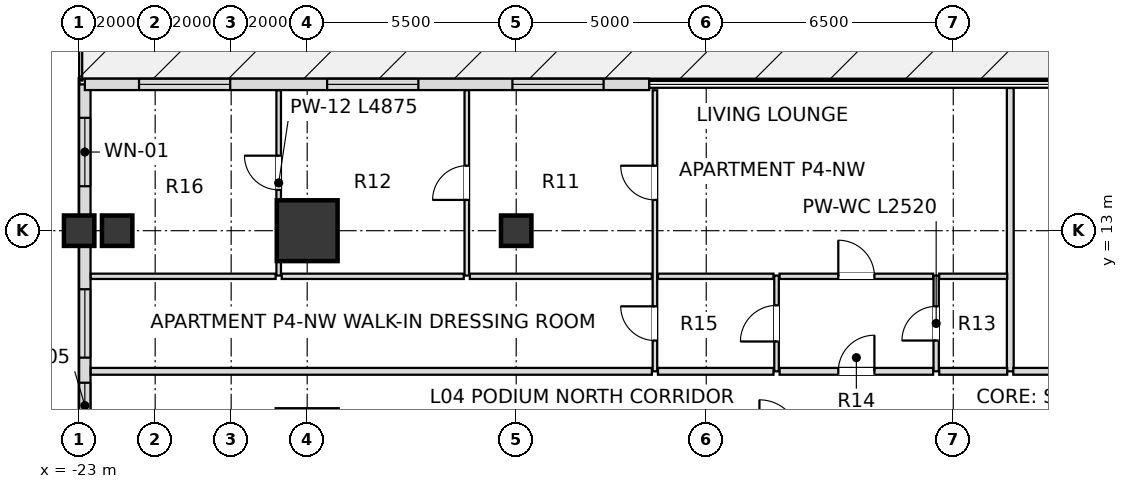
"""IFC4 building model, lengths in metres.
Left out: names, types, materials, properties, quantities, classifications, styles, units other than length and angle.
Written with IfcOpenShell. Run it as: python <this file> out.ifc"""

import sys

from ifc_helpers import new_model, si_unit, direction, frame, frame_2d, origin, origin_2d, place, context, subcontext, project, spatial, rectangle, extrude, element, fill, save


model = new_model("IFC4")
c1 = context("Model", 3, precision=1e-05, world=origin(), true_north=direction((0.0, 1.0)))
c2 = subcontext(c1, "Body", "Model", "MODEL_VIEW")
j1 = project(units=[si_unit("LENGTHUNIT", "METRE"), si_unit("PLANEANGLEUNIT", "RADIAN")], contexts=[c1])
p1 = place(None, origin())
s1 = spatial("IfcSite", under=j1, at=p1, CompositionType="ELEMENT")
p2 = place(p1, origin())
s2 = spatial("IfcBuilding", under=s1, at=p2, CompositionType="ELEMENT")
p3 = place(p2, frame((0.0, 0.0, 22.2)))
s3 = spatial("IfcBuildingStorey", under=s2, at=p3, CompositionType="ELEMENT", Elevation=22.2)
p4 = place(p3, frame((-17.0, 13.0, 0.0), z_axis=(0.0, 0.0, 1.0), x_axis=(1.0, 0.0, 0.0)))
e1 = element("IfcColumn", 1, at=p4, inside=s3, PredefinedType="USERDEFINED", context=c2, shape_type="SweptSolid", body=[
    extrude(rectangle(XDim=1.6, YDim=1.6, at=origin_2d()), origin(), (0.0, 0.0, 1.0), 5.4),
])
for number, where, z_axis, x_axis in (
    (2, (-23.0, 13.0, 0.0), (0.0, 0.0, 1.0), (1.0, 0.0, 0.0)),
    (3, (-11.5, 13.0, 0.0), (0.0, 0.0, 1.0), (1.0, 0.0, 0.0)),
    (4, (-22.0, 13.0, 0.0), (0.0, 0.0, 1.0), (1.0, 0.0, 0.0)),
):
    element("IfcColumn", number, at=place(p3, frame(where, z_axis=z_axis, x_axis=x_axis)), inside=s3, PredefinedType="COLUMN", context=c2, shape_type="SweptSolid", body=[
        extrude(rectangle(XDim=0.8, YDim=0.8, at=origin_2d()), origin(), (0.0, 0.0, 1.0), 5.4),
    ])
p5 = place(p3, frame((-22.85, 16.85, 0.0), z_axis=(0.0, 0.0, 1.0), x_axis=(0.0, -1.0, 0.0)))
e5 = element("IfcWall", 5, at=p5, inside=s3, PredefinedType="SOLIDWALL", context=c2, shape_type="SweptSolid", body=[
    extrude(rectangle(XDim=33.7, YDim=0.3, at=frame_2d((16.85, 0.0))), origin(), (0.0, 0.0, 1.0), 2.985),
])
p6 = place(p5, frame((0.88, 0.0, 0.72)))
e6 = element("IfcOpeningElement", 6, at=p6, cuts=e5, PredefinedType="OPENING", context=c2, shape_type="SweptSolid", body=[
    extrude(rectangle(XDim=1.8, YDim=1.68, at=frame_2d((0.9, 0.84))), frame((0.0, 0.16, 0.0), z_axis=(0.0, -1.0, 0.0), x_axis=(1.0, 0.0, 0.0)), (0.0, 0.0, 1.0), 0.32),
])
p7 = place(p5, frame((5.39, 0.0, 0.72)))
e7 = element("IfcOpeningElement", 7, at=p7, cuts=e5, PredefinedType="OPENING", context=c2, shape_type="SweptSolid", body=[
    extrude(rectangle(XDim=1.8, YDim=1.68, at=frame_2d((0.9, 0.84))), frame((0.0, 0.16, 0.0), z_axis=(0.0, -1.0, 0.0), x_axis=(1.0, 0.0, 0.0)), (0.0, 0.0, 1.0), 0.32),
])
p8 = place(p5, frame((7.85, 0.0, 0.72)))
e8 = element("IfcOpeningElement", 8, at=p8, cuts=e5, PredefinedType="OPENING", context=c2, shape_type="SweptSolid", body=[
    extrude(rectangle(XDim=1.2, YDim=1.68, at=frame_2d((0.6, 0.84))), frame((0.0, 0.16, 0.0), z_axis=(0.0, -1.0, 0.0), x_axis=(1.0, 0.0, 0.0)), (0.0, 0.0, 1.0), 0.32),
])
p9 = place(p5, frame((10.295, 0.0, 0.72)))
e9 = element("IfcOpeningElement", 9, at=p9, cuts=e5, PredefinedType="OPENING", context=c2, shape_type="SweptSolid", body=[
    extrude(rectangle(XDim=1.8, YDim=1.68, at=frame_2d((0.9, 0.84))), frame((0.0, 0.16, 0.0), z_axis=(0.0, -1.0, 0.0), x_axis=(1.0, 0.0, 0.0)), (0.0, 0.0, 1.0), 0.32),
])
p10 = place(p5, frame((13.665, 0.0, 0.72)))
e10 = element("IfcOpeningElement", 10, at=p10, cuts=e5, PredefinedType="OPENING", context=c2, shape_type="SweptSolid", body=[
    extrude(rectangle(XDim=1.8, YDim=1.68, at=frame_2d((0.9, 0.84))), frame((0.0, 0.16, 0.0), z_axis=(0.0, -1.0, 0.0), x_axis=(1.0, 0.0, 0.0)), (0.0, 0.0, 1.0), 0.32),
])
p11 = place(p5, frame((18.235, 0.0, 0.72)))
e11 = element("IfcOpeningElement", 11, at=p11, cuts=e5, PredefinedType="OPENING", context=c2, shape_type="SweptSolid", body=[
    extrude(rectangle(XDim=1.8, YDim=1.68, at=frame_2d((0.9, 0.84))), frame((0.0, 0.16, 0.0), z_axis=(0.0, -1.0, 0.0), x_axis=(1.0, 0.0, 0.0)), (0.0, 0.0, 1.0), 0.32),
])
p12 = place(p5, frame((21.605, 0.0, 0.72)))
e12 = element("IfcOpeningElement", 12, at=p12, cuts=e5, PredefinedType="OPENING", context=c2, shape_type="SweptSolid", body=[
    extrude(rectangle(XDim=1.8, YDim=1.68, at=frame_2d((0.9, 0.84))), frame((0.0, 0.16, 0.0), z_axis=(0.0, -1.0, 0.0), x_axis=(1.0, 0.0, 0.0)), (0.0, 0.0, 1.0), 0.32),
])
p13 = place(p5, frame((24.65, 0.0, 0.72)))
e13 = element("IfcOpeningElement", 13, at=p13, cuts=e5, PredefinedType="OPENING", context=c2, shape_type="SweptSolid", body=[
    extrude(rectangle(XDim=1.2, YDim=1.68, at=frame_2d((0.6, 0.84))), frame((0.0, 0.16, 0.0), z_axis=(0.0, -1.0, 0.0), x_axis=(1.0, 0.0, 0.0)), (0.0, 0.0, 1.0), 0.32),
])
p14 = place(p5, frame((26.51, 0.0, 0.72)))
e14 = element("IfcOpeningElement", 14, at=p14, cuts=e5, PredefinedType="OPENING", context=c2, shape_type="SweptSolid", body=[
    extrude(rectangle(XDim=1.8, YDim=1.68, at=frame_2d((0.9, 0.84))), frame((0.0, 0.16, 0.0), z_axis=(0.0, -1.0, 0.0), x_axis=(1.0, 0.0, 0.0)), (0.0, 0.0, 1.0), 0.32),
])
p15 = place(p5, frame((31.02, 0.0, 0.72)))
e15 = element("IfcOpeningElement", 15, at=p15, cuts=e5, PredefinedType="OPENING", context=c2, shape_type="SweptSolid", body=[
    extrude(rectangle(XDim=1.8, YDim=1.68, at=frame_2d((0.9, 0.84))), frame((0.0, 0.16, 0.0), z_axis=(0.0, -1.0, 0.0), x_axis=(1.0, 0.0, 0.0)), (0.0, 0.0, 1.0), 0.32),
])
p16 = place(p3, frame((-22.85, 16.85, 0.0), z_axis=(0.0, 0.0, 1.0), x_axis=(1.0, 0.0, 0.0)))
e16 = element("IfcWall", 16, at=p16, inside=s3, PredefinedType="SOLIDWALL", context=c2, shape_type="SweptSolid", body=[
    extrude(rectangle(XDim=14.85, YDim=0.3, at=frame_2d((7.425, 0.0))), origin(), (0.0, 0.0, 1.0), 4.356),
])
p17 = place(p16, frame((1.425, 0.0, 0.8)))
e17 = element("IfcOpeningElement", 17, at=p17, cuts=e16, PredefinedType="OPENING", context=c2, shape_type="SweptSolid", body=[
    extrude(rectangle(XDim=2.4, YDim=2.2, at=frame_2d((1.2, 1.1))), frame((0.0, 0.16, 0.0), z_axis=(0.0, -1.0, 0.0), x_axis=(1.0, 0.0, 0.0)), (0.0, 0.0, 1.0), 0.32),
])
p18 = place(p16, frame((6.375, 0.0, 0.8)))
e18 = element("IfcOpeningElement", 18, at=p18, cuts=e16, PredefinedType="OPENING", context=c2, shape_type="SweptSolid", body=[
    extrude(rectangle(XDim=2.4, YDim=2.2, at=frame_2d((1.2, 1.1))), frame((0.0, 0.16, 0.0), z_axis=(0.0, -1.0, 0.0), x_axis=(1.0, 0.0, 0.0)), (0.0, 0.0, 1.0), 0.32),
])
p19 = place(p16, frame((11.25, 0.0, 0.8)))
e19 = element("IfcOpeningElement", 19, at=p19, cuts=e16, PredefinedType="OPENING", context=c2, shape_type="SweptSolid", body=[
    extrude(rectangle(XDim=2.4, YDim=2.2, at=frame_2d((1.2, 1.1))), frame((0.0, 0.16, 0.0), z_axis=(0.0, -1.0, 0.0), x_axis=(1.0, 0.0, 0.0)), (0.0, 0.0, 1.0), 0.32),
])
p20 = place(p3, frame((-17.75, 11.82, 0.0), z_axis=(0.0, 0.0, 1.0), x_axis=(0.0, 1.0, 0.0)))
e20 = element("IfcWall", 20, at=p20, inside=s3, PredefinedType="PARTITIONING", context=c2, shape_type="SweptSolid", body=[
    extrude(rectangle(XDim=4.875, YDim=0.12, at=frame_2d((2.438, 0.0))), origin(), (0.0, 0.0, 1.0), 2.985),
])
p21 = place(p20, frame((2.254, 0.0, 0.0)))
e21 = element("IfcOpeningElement", 21, at=p21, cuts=e20, PredefinedType="OPENING", context=c2, shape_type="SweptSolid", body=[
    extrude(rectangle(XDim=0.9, YDim=2.1, at=frame_2d((0.45, 1.05))), frame((0.0, 0.07, 0.0), z_axis=(0.0, -1.0, 0.0), x_axis=(1.0, 0.0, 0.0)), (0.0, 0.0, 1.0), 0.14),
])
p22 = place(p3, frame((-12.8, 11.82, 0.0), z_axis=(0.0, 0.0, 1.0), x_axis=(0.0, 1.0, 0.0)))
e22 = element("IfcWall", 22, at=p22, inside=s3, PredefinedType="PARTITIONING", context=c2, shape_type="SweptSolid", body=[
    extrude(rectangle(XDim=4.875, YDim=0.12, at=frame_2d((2.438, 0.0))), origin(), (0.0, 0.0, 1.0), 4.356),
])
p23 = place(p22, frame((1.99, 0.0, 0.0)))
e23 = element("IfcOpeningElement", 23, at=p23, cuts=e22, PredefinedType="OPENING", context=c2, shape_type="SweptSolid", body=[
    extrude(rectangle(XDim=0.9, YDim=2.1, at=frame_2d((0.45, 1.05))), frame((0.0, 0.07, 0.0), z_axis=(0.0, -1.0, 0.0), x_axis=(1.0, 0.0, 0.0)), (0.0, 0.0, 1.0), 0.14),
])
p24 = place(p3, frame((-7.85, 9.3, 0.0), z_axis=(0.0, 0.0, 1.0), x_axis=(0.0, 1.0, 0.0)))
e24 = element("IfcWall", 24, at=p24, inside=s3, PredefinedType="PARTITIONING", context=c2, shape_type="SweptSolid", body=[
    extrude(rectangle(XDim=7.395, YDim=0.12, at=frame_2d((3.698, 0.0))), origin(), (0.0, 0.0, 1.0), 4.436),
])
p25 = place(p24, frame((0.81, 0.0, 0.0)))
e25 = element("IfcOpeningElement", 25, at=p25, cuts=e24, PredefinedType="OPENING", context=c2, shape_type="SweptSolid", body=[
    extrude(rectangle(XDim=0.9, YDim=2.1, at=frame_2d((0.45, 1.05))), frame((0.0, 0.07, 0.0), z_axis=(0.0, -1.0, 0.0), x_axis=(1.0, 0.0, 0.0)), (0.0, 0.0, 1.0), 0.14),
])
p26 = place(p24, frame((4.51, 0.0, 0.0)))
e26 = element("IfcOpeningElement", 26, at=p26, cuts=e24, PredefinedType="OPENING", context=c2, shape_type="SweptSolid", body=[
    extrude(rectangle(XDim=0.9, YDim=2.1, at=frame_2d((0.45, 1.05))), frame((0.0, 0.07, 0.0), z_axis=(0.0, -1.0, 0.0), x_axis=(1.0, 0.0, 0.0)), (0.0, 0.0, 1.0), 0.14),
])
p27 = place(p3, frame((-4.65, 9.3, 0.0), z_axis=(0.0, 0.0, 1.0), x_axis=(0.0, 1.0, 0.0)))
e27 = element("IfcWall", 27, at=p27, inside=s3, PredefinedType="PARTITIONING", context=c2, shape_type="SweptSolid", body=[
    extrude(rectangle(XDim=2.52, YDim=0.12, at=frame_2d((1.26, 0.0))), origin(), (0.0, 0.0, 1.0), 5.0),
])
p28 = place(p27, frame((0.785, 0.0, 0.0)))
e28 = element("IfcOpeningElement", 28, at=p28, cuts=e27, PredefinedType="OPENING", context=c2, shape_type="SweptSolid", body=[
    extrude(rectangle(XDim=0.95, YDim=2.1, at=frame_2d((0.475, 1.05))), frame((0.0, 0.07, 0.0), z_axis=(0.0, -1.0, 0.0), x_axis=(1.0, 0.0, 0.0)), (0.0, 0.0, 1.0), 0.14),
])
p29 = place(p3, frame((-0.45, 9.3, 0.0), z_axis=(0.0, 0.0, 1.0), x_axis=(0.0, 1.0, 0.0)))
e29 = element("IfcWall", 29, at=p29, inside=s3, PredefinedType="PARTITIONING", context=c2, shape_type="SweptSolid", body=[
    extrude(rectangle(XDim=2.52, YDim=0.14, at=frame_2d((1.26, 0.0))), origin(), (0.0, 0.0, 1.0), 5.0),
])
p30 = place(p29, frame((0.81, 0.0, 0.0)))
e30 = element("IfcOpeningElement", 30, at=p30, cuts=e29, PredefinedType="OPENING", context=c2, shape_type="SweptSolid", body=[
    extrude(rectangle(XDim=0.9, YDim=2.1, at=frame_2d((0.45, 1.05))), frame((0.0, 0.08, 0.0), z_axis=(0.0, -1.0, 0.0), x_axis=(1.0, 0.0, 0.0)), (0.0, 0.0, 1.0), 0.16),
])
p31 = place(p3, frame((1.5, 9.3, 0.0), z_axis=(0.0, 0.0, 1.0), x_axis=(0.0, 1.0, 0.0)))
e31 = element("IfcWall", 31, at=p31, inside=s3, PredefinedType="PARTITIONING", context=c2, shape_type="SweptSolid", body=[
    extrude(rectangle(XDim=7.455, YDim=0.18, at=frame_2d((3.728, 0.0))), origin(), (0.0, 0.0, 1.0), 4.568),
])
p32 = place(p3, frame((-22.695, 9.3, 0.0), z_axis=(0.0, 0.0, 1.0), x_axis=(1.0, 0.0, 0.0)))
e32 = element("IfcWall", 32, at=p32, inside=s3, PredefinedType="PARTITIONING", context=c2, shape_type="SweptSolid", body=[
    extrude(rectangle(XDim=14.765, YDim=0.18, at=frame_2d((7.383, 0.0))), origin(), (0.0, 0.0, 1.0), 4.356),
])
p33 = place(p3, frame((-7.77, 9.3, 0.0), z_axis=(0.0, 0.0, 1.0), x_axis=(1.0, 0.0, 0.0)))
e33 = element("IfcWall", 33, at=p33, inside=s3, PredefinedType="PARTITIONING", context=c2, shape_type="SweptSolid", body=[
    extrude(rectangle(XDim=3.04, YDim=0.18, at=frame_2d((1.52, 0.0))), origin(), (0.0, 0.0, 1.0), 4.436),
])
p34 = place(p3, frame((-4.57, 9.3, 0.0), z_axis=(0.0, 0.0, 1.0), x_axis=(1.0, 0.0, 0.0)))
e34 = element("IfcWall", 34, at=p34, inside=s3, PredefinedType="PARTITIONING", context=c2, shape_type="SweptSolid", body=[
    extrude(rectangle(XDim=4.04, YDim=0.18, at=frame_2d((2.02, 0.0))), origin(), (0.0, 0.0, 1.0), 5.0),
])
p35 = place(p34, frame((1.545, 0.0, 0.0)))
e35 = element("IfcOpeningElement", 35, at=p35, cuts=e34, PredefinedType="OPENING", context=c2, shape_type="SweptSolid", body=[
    extrude(rectangle(XDim=0.95, YDim=2.15, at=frame_2d((0.475, 1.075))), frame((0.0, 0.1, 0.0), z_axis=(0.0, -1.0, 0.0), x_axis=(1.0, 0.0, 0.0)), (0.0, 0.0, 1.0), 0.2),
])
p36 = place(p3, frame((-0.37, 9.3, 0.0), z_axis=(0.0, 0.0, 1.0), x_axis=(1.0, 0.0, 0.0)))
e36 = element("IfcWall", 36, at=p36, inside=s3, PredefinedType="PARTITIONING", context=c2, shape_type="SweptSolid", body=[
    extrude(rectangle(XDim=1.79, YDim=0.18, at=frame_2d((0.895, 0.0))), origin(), (0.0, 0.0, 1.0), 5.0),
])
p37 = place(p3, frame((1.58, 9.3, 0.0), z_axis=(0.0, 0.0, 1.0), x_axis=(1.0, 0.0, 0.0)))
e37 = element("IfcWall", 37, at=p37, inside=s3, PredefinedType="PARTITIONING", context=c2, shape_type="SweptSolid", body=[
    extrude(rectangle(XDim=21.115, YDim=0.18, at=frame_2d((10.558, 0.0))), origin(), (0.0, 0.0, 1.0), 4.356),
])
p38 = place(p37, frame((8.945, 0.0, 0.0)))
e38 = element("IfcOpeningElement", 38, at=p38, cuts=e37, PredefinedType="OPENING", context=c2, shape_type="SweptSolid", body=[
    extrude(rectangle(XDim=0.95, YDim=2.15, at=frame_2d((0.475, 1.075))), frame((0.0, 0.1, 0.0), z_axis=(0.0, -1.0, 0.0), x_axis=(1.0, 0.0, 0.0)), (0.0, 0.0, 1.0), 0.2),
])
p39 = place(p3, frame((-22.695, 11.8, 0.0), z_axis=(0.0, 0.0, 1.0), x_axis=(1.0, 0.0, 0.0)))
e39 = element("IfcWall", 39, at=p39, inside=s3, PredefinedType="PARTITIONING", context=c2, shape_type="SweptSolid", body=[
    extrude(rectangle(XDim=4.865, YDim=0.14, at=frame_2d((2.433, 0.0))), origin(), (0.0, 0.0, 1.0), 4.356),
])
p40 = place(p3, frame((-17.67, 11.8, 0.0), z_axis=(0.0, 0.0, 1.0), x_axis=(1.0, 0.0, 0.0)))
e40 = element("IfcWall", 40, at=p40, inside=s3, PredefinedType="PARTITIONING", context=c2, shape_type="SweptSolid", body=[
    extrude(rectangle(XDim=4.79, YDim=0.14, at=frame_2d((2.395, 0.0))), origin(), (0.0, 0.0, 1.0), 4.436),
])
p41 = place(p3, frame((-12.72, 11.8, 0.0), z_axis=(0.0, 0.0, 1.0), x_axis=(1.0, 0.0, 0.0)))
e41 = element("IfcWall", 41, at=p41, inside=s3, PredefinedType="PARTITIONING", context=c2, shape_type="SweptSolid", body=[
    extrude(rectangle(XDim=4.79, YDim=0.14, at=frame_2d((2.395, 0.0))), origin(), (0.0, 0.0, 1.0), 5.0),
])
p42 = place(p3, frame((-7.77, 11.8, 0.0), z_axis=(0.0, 0.0, 1.0), x_axis=(1.0, 0.0, 0.0)))
e42 = element("IfcWall", 42, at=p42, inside=s3, PredefinedType="PARTITIONING", context=c2, shape_type="SweptSolid", body=[
    extrude(rectangle(XDim=3.04, YDim=0.14, at=frame_2d((1.52, 0.0))), origin(), (0.0, 0.0, 1.0), 4.436),
])
p43 = place(p3, frame((-4.57, 11.8, 0.0), z_axis=(0.0, 0.0, 1.0), x_axis=(1.0, 0.0, 0.0)))
e43 = element("IfcWall", 43, at=p43, inside=s3, PredefinedType="PARTITIONING", context=c2, shape_type="SweptSolid", body=[
    extrude(rectangle(XDim=4.04, YDim=0.14, at=frame_2d((2.02, 0.0))), origin(), (0.0, 0.0, 1.0), 5.0),
])
p44 = place(p43, frame((1.545, 0.0, 0.0)))
e44 = element("IfcOpeningElement", 44, at=p44, cuts=e43, PredefinedType="OPENING", context=c2, shape_type="SweptSolid", body=[
    extrude(rectangle(XDim=0.95, YDim=2.1, at=frame_2d((0.475, 1.05))), frame((0.0, 0.08, 0.0), z_axis=(0.0, -1.0, 0.0), x_axis=(1.0, 0.0, 0.0)), (0.0, 0.0, 1.0), 0.16),
])
p45 = place(p3, frame((-0.37, 11.8, 0.0), z_axis=(0.0, 0.0, 1.0), x_axis=(1.0, 0.0, 0.0)))
e45 = element("IfcWall", 45, at=p45, inside=s3, PredefinedType="PARTITIONING", context=c2, shape_type="SweptSolid", body=[
    extrude(rectangle(XDim=1.79, YDim=0.14, at=frame_2d((0.895, 0.0))), origin(), (0.0, 0.0, 1.0), 5.0),
])
p46 = place(p6, origin())
e46 = element("IfcWindow", 46, at=p46, inside=s3, PartitioningType="SINGLE_PANEL", PredefinedType="WINDOW", context=c2, shape_type="SweptSolid", body=[
    extrude(rectangle(XDim=1.8, YDim=1.68, at=frame_2d((0.9, 0.84))), frame((0.0, 0.03, 0.0), z_axis=(0.0, -1.0, 0.0), x_axis=(1.0, 0.0, 0.0)), (0.0, 0.0, 1.0), 0.06),
])
fill(e6, e46)
p47 = place(p7, origin())
e47 = element("IfcWindow", 47, at=p47, inside=s3, PartitioningType="SINGLE_PANEL", PredefinedType="WINDOW", context=c2, shape_type="SweptSolid", body=[
    extrude(rectangle(XDim=1.8, YDim=1.68, at=frame_2d((0.9, 0.84))), frame((0.0, 0.03, 0.0), z_axis=(0.0, -1.0, 0.0), x_axis=(1.0, 0.0, 0.0)), (0.0, 0.0, 1.0), 0.06),
])
fill(e7, e47)
p48 = place(p8, origin())
e48 = element("IfcWindow", 48, at=p48, inside=s3, PartitioningType="SINGLE_PANEL", PredefinedType="WINDOW", context=c2, shape_type="SweptSolid", body=[
    extrude(rectangle(XDim=1.2, YDim=1.68, at=frame_2d((0.6, 0.84))), frame((0.0, 0.03, 0.0), z_axis=(0.0, -1.0, 0.0), x_axis=(1.0, 0.0, 0.0)), (0.0, 0.0, 1.0), 0.06),
])
fill(e8, e48)
p49 = place(p17, origin())
e49 = element("IfcWindow", 49, at=p49, inside=s3, PartitioningType="SINGLE_PANEL", PredefinedType="WINDOW", context=c2, shape_type="SweptSolid", body=[
    extrude(rectangle(XDim=2.4, YDim=2.2, at=frame_2d((1.2, 1.1))), frame((0.0, 0.03, 0.0), z_axis=(0.0, -1.0, 0.0), x_axis=(1.0, 0.0, 0.0)), (0.0, 0.0, 1.0), 0.06),
])
fill(e17, e49)
p50 = place(p18, origin())
e50 = element("IfcWindow", 50, at=p50, inside=s3, PartitioningType="SINGLE_PANEL", PredefinedType="WINDOW", context=c2, shape_type="SweptSolid", body=[
    extrude(rectangle(XDim=2.4, YDim=2.2, at=frame_2d((1.2, 1.1))), frame((0.0, 0.03, 0.0), z_axis=(0.0, -1.0, 0.0), x_axis=(1.0, 0.0, 0.0)), (0.0, 0.0, 1.0), 0.06),
])
fill(e18, e50)
p51 = place(p19, origin())
e51 = element("IfcWindow", 51, at=p51, inside=s3, PartitioningType="SINGLE_PANEL", PredefinedType="WINDOW", context=c2, shape_type="SweptSolid", body=[
    extrude(rectangle(XDim=2.4, YDim=2.2, at=frame_2d((1.2, 1.1))), frame((0.0, 0.03, 0.0), z_axis=(0.0, -1.0, 0.0), x_axis=(1.0, 0.0, 0.0)), (0.0, 0.0, 1.0), 0.06),
])
fill(e19, e51)
p52 = place(p30, origin())
e52 = element("IfcDoor", 52, at=p52, inside=s3, OperationType="SINGLE_SWING_LEFT", PredefinedType="DOOR", context=c2, shape_type="SweptSolid", body=[
    extrude(rectangle(XDim=0.9, YDim=2.1, at=frame_2d((0.45, 1.05))), frame((0.0, 0.025, 0.0), z_axis=(0.0, -1.0, 0.0), x_axis=(1.0, 0.0, 0.0)), (0.0, 0.0, 1.0), 0.05),
])
fill(e30, e52)
p53 = place(p35, origin())
e53 = element("IfcDoor", 53, at=p53, inside=s3, OperationType="SINGLE_SWING_RIGHT", PredefinedType="DOOR", context=c2, shape_type="SweptSolid", body=[
    extrude(rectangle(XDim=0.95, YDim=2.15, at=frame_2d((0.475, 1.075))), frame((0.0, 0.025, 0.0), z_axis=(0.0, -1.0, 0.0), x_axis=(1.0, 0.0, 0.0)), (0.0, 0.0, 1.0), 0.05),
])
fill(e35, e53)
p54 = place(p28, origin())
e54 = element("IfcDoor", 54, at=p54, inside=s3, OperationType="SINGLE_SWING_LEFT", PredefinedType="DOOR", context=c2, shape_type="SweptSolid", body=[
    extrude(rectangle(XDim=0.95, YDim=2.1, at=frame_2d((0.475, 1.05))), frame((0.0, 0.025, 0.0), z_axis=(0.0, -1.0, 0.0), x_axis=(1.0, 0.0, 0.0)), (0.0, 0.0, 1.0), 0.05),
])
fill(e28, e54)
p55 = place(p25, origin())
e55 = element("IfcDoor", 55, at=p55, inside=s3, OperationType="SINGLE_SWING_RIGHT", PredefinedType="DOOR", context=c2, shape_type="SweptSolid", body=[
    extrude(rectangle(XDim=0.9, YDim=2.1, at=frame_2d((0.45, 1.05))), frame((0.0, 0.025, 0.0), z_axis=(0.0, -1.0, 0.0), x_axis=(1.0, 0.0, 0.0)), (0.0, 0.0, 1.0), 0.05),
])
fill(e25, e55)
p56 = place(p44, origin())
e56 = element("IfcDoor", 56, at=p56, inside=s3, OperationType="SINGLE_SWING_LEFT", PredefinedType="DOOR", context=c2, shape_type="SweptSolid", body=[
    extrude(rectangle(XDim=0.95, YDim=2.1, at=frame_2d((0.475, 1.05))), frame((0.0, 0.025, 0.0), z_axis=(0.0, -1.0, 0.0), x_axis=(1.0, 0.0, 0.0)), (0.0, 0.0, 1.0), 0.05),
])
fill(e44, e56)
p57 = place(p26, origin())
e57 = element("IfcDoor", 57, at=p57, inside=s3, OperationType="SINGLE_SWING_RIGHT", PredefinedType="DOOR", context=c2, shape_type="SweptSolid", body=[
    extrude(rectangle(XDim=0.9, YDim=2.1, at=frame_2d((0.45, 1.05))), frame((0.0, 0.025, 0.0), z_axis=(0.0, -1.0, 0.0), x_axis=(1.0, 0.0, 0.0)), (0.0, 0.0, 1.0), 0.05),
])
fill(e26, e57)
p58 = place(p23, origin())
e58 = element("IfcDoor", 58, at=p58, inside=s3, OperationType="SINGLE_SWING_LEFT", PredefinedType="DOOR", context=c2, shape_type="SweptSolid", body=[
    extrude(rectangle(XDim=0.9, YDim=2.1, at=frame_2d((0.45, 1.05))), frame((0.0, 0.025, 0.0), z_axis=(0.0, -1.0, 0.0), x_axis=(1.0, 0.0, 0.0)), (0.0, 0.0, 1.0), 0.05),
])
fill(e23, e58)
p59 = place(p21, origin())
e59 = element("IfcDoor", 59, at=p59, inside=s3, OperationType="SINGLE_SWING_RIGHT", PredefinedType="DOOR", context=c2, shape_type="SweptSolid", body=[
    extrude(rectangle(XDim=0.9, YDim=2.1, at=frame_2d((0.45, 1.05))), frame((0.0, 0.025, 0.0), z_axis=(0.0, -1.0, 0.0), x_axis=(1.0, 0.0, 0.0)), (0.0, 0.0, 1.0), 0.05),
])
fill(e21, e59)
save(model, sys.argv[1])
